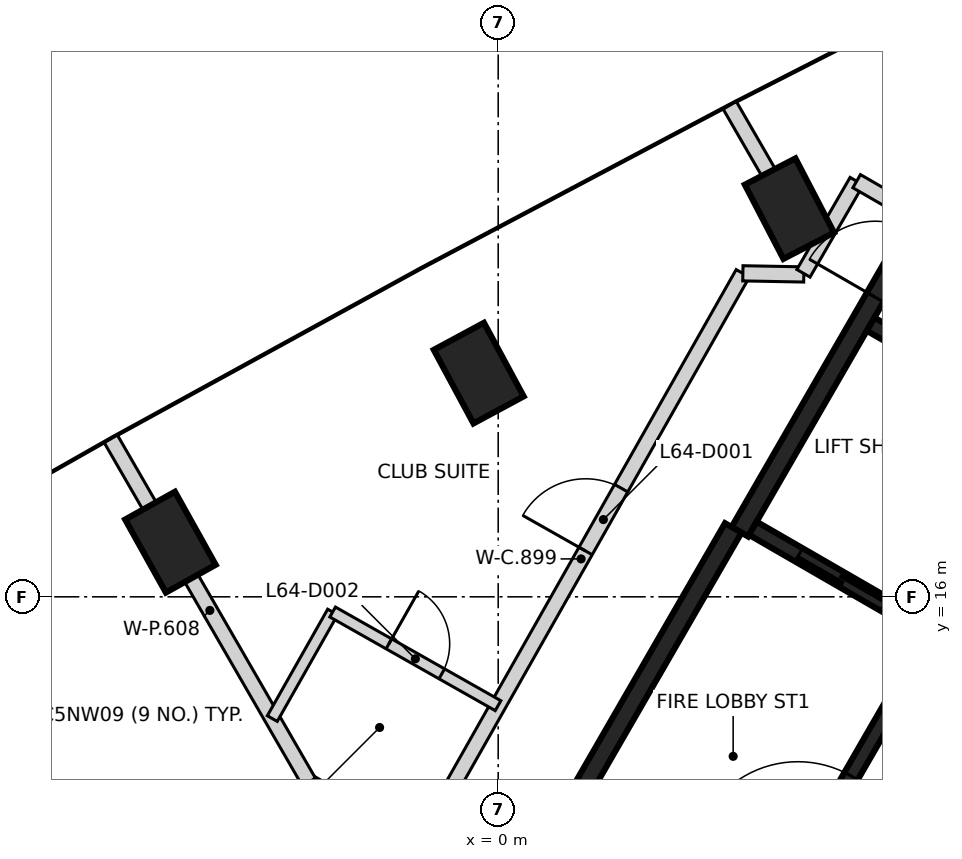
"""IFC4 building model, lengths in metres.
Left out: names, types, materials, properties, quantities, classifications, styles, units other than length and angle.
Written with IfcOpenShell. Run it as: python <this file> out.ifc"""

import sys

from ifc_helpers import new_model, si_unit, direction, frame, frame_2d, origin, origin_2d, place, context, subcontext, project, spatial, rectangle, extrude, element, fill, save


model = new_model("IFC4")
c1 = context("Model", 3, precision=1e-05, world=origin(), true_north=direction((0.0, 1.0)))
c2 = subcontext(c1, "Body", "Model", "MODEL_VIEW")
j1 = project(units=[si_unit("LENGTHUNIT", "METRE"), si_unit("PLANEANGLEUNIT", "RADIAN")], contexts=[c1])
p1 = place(None, origin())
s1 = spatial("IfcSite", under=j1, at=p1, CompositionType="ELEMENT")
p2 = place(p1, origin())
s2 = spatial("IfcBuilding", under=s1, at=p2, CompositionType="ELEMENT")
p3 = place(p2, frame((0.0, 0.0, 253.8)))
s3 = spatial("IfcBuildingStorey", under=s2, at=p3, CompositionType="ELEMENT", Elevation=253.8)
for number, where, z_axis, x_axis in (
    (1, (3.832, 21.107, -0.35), (0.0, 0.0, 1.0), (-0.461, 0.887, 0.0)),
    (2, (-0.256, 18.943, -0.35), (0.0, 0.0, 1.0), (-0.475, 0.88, 0.0)),
    (3, (-4.312, 16.719, -0.35), (0.0, 0.0, 1.0), (-0.487, 0.873, 0.0)),
):
    element("IfcColumn", number, at=place(p3, frame(where, z_axis=z_axis, x_axis=x_axis)), inside=s3, PredefinedType="COLUMN", context=c2, shape_type="SweptSolid", body=[
        extrude(rectangle(XDim=1.1, YDim=0.75, at=origin_2d()), origin(), (0.0, 0.0, 1.0), 2.64),
    ])
p4 = place(p3, frame((3.179, 16.856, 0.0), z_axis=(0.0, 0.0, 1.0), x_axis=(0.500001955336, 0.866024274868, 0.0)))
e4 = element("IfcWall", 4, at=p4, inside=s3, PredefinedType="SHEAR", context=c2, shape_type="SweptSolid", body=[
    extrude(rectangle(XDim=6.125, YDim=0.25, at=frame_2d((3.062, 0.0))), origin(), (0.0, 0.0, 1.0), 3.2),
])
p5 = place(p4, frame((3.563, 0.0, 0.0)))
e5 = element("IfcOpeningElement", 5, at=p5, cuts=e4, PredefinedType="OPENING", context=c2, shape_type="SweptSolid", body=[
    extrude(rectangle(XDim=1.0, YDim=2.1, at=frame_2d((0.5, 1.05))), frame((0.0, 0.135, 0.0), z_axis=(0.0, -1.0, 0.0), x_axis=(1.0, 0.0, 0.0)), (0.0, 0.0, 1.0), 0.27),
])
p6 = place(p3, frame((0.48, 12.381, 0.0), z_axis=(0.0, 0.0, 1.0), x_axis=(0.49999885962, 0.866026062182, 0.0)))
e6 = element("IfcWall", 6, at=p6, inside=s3, PredefinedType="SHEAR", context=c2, shape_type="SweptSolid", body=[
    extrude(rectangle(XDim=5.225, YDim=0.25, at=frame_2d((2.612, 0.0))), origin(), (0.0, 0.0, 1.0), 3.2),
])
p7 = place(p3, frame((3.057, 10.895, 0.0), z_axis=(0.0, 0.0, 1.0), x_axis=(0.500027839223, 0.866009330205, 0.0)))
e7 = element("IfcWall", 7, at=p7, inside=s3, PredefinedType="SHEAR", context=c2, shape_type="SweptSolid", body=[
    extrude(rectangle(XDim=5.098, YDim=0.2, at=frame_2d((2.549, 0.0))), origin(), (0.0, 0.0, 1.0), 3.2),
])
p8 = place(p7, frame((1.774, 0.0, 0.0)))
e8 = element("IfcOpeningElement", 8, at=p8, cuts=e7, PredefinedType="OPENING", context=c2, shape_type="SweptSolid", body=[
    extrude(rectangle(XDim=1.4, YDim=2.1, at=frame_2d((0.7, 1.05))), frame((0.0, 0.11, 0.0), z_axis=(0.0, -1.0, 0.0), x_axis=(1.0, 0.0, 0.0)), (0.0, 0.0, 1.0), 0.22),
])
p9 = place(p3, frame((5.646, 15.576, 0.0), z_axis=(0.0, 0.0, 1.0), x_axis=(-0.866018407898, 0.500012117035, 0.0)))
e9 = element("IfcWall", 9, at=p9, inside=s3, PredefinedType="SHEAR", context=c2, shape_type="SweptSolid", body=[
    extrude(rectangle(XDim=2.651, YDim=0.2, at=frame_2d((1.325, 0.0))), origin(), (0.0, 0.0, 1.0), 3.2),
])
p10 = place(p9, frame((0.652, 0.0, 0.0)))
e10 = element("IfcOpeningElement", 10, at=p10, cuts=e9, PredefinedType="OPENING", context=c2, shape_type="SweptSolid", body=[
    extrude(rectangle(XDim=1.3, YDim=2.1, at=frame_2d((0.65, 1.05))), frame((0.0, 0.11, 0.0), z_axis=(0.0, -1.0, 0.0), x_axis=(1.0, 0.0, 0.0)), (0.0, 0.0, 1.0), 0.22),
])
p11 = place(p3, frame((7.196, 18.26, 0.0), z_axis=(0.0, 0.0, 1.0), x_axis=(-0.866018407898, 0.500012117035, 0.0)))
e11 = element("IfcWall", 11, at=p11, inside=s3, PredefinedType="SHEAR", context=c2, shape_type="SweptSolid", body=[
    extrude(rectangle(XDim=2.651, YDim=0.2, at=frame_2d((1.325, 0.0))), origin(), (0.0, 0.0, 1.0), 3.2),
])
p12 = place(p3, frame((-2.483, 13.551, 0.0), z_axis=(0.0, 0.0, 1.0), x_axis=(0.499878046143, -0.866095802429, 0.0)))
e12 = element("IfcWall", 12, at=p12, inside=s3, PredefinedType="PARTITIONING", context=c2, shape_type="SweptSolid", body=[
    extrude(rectangle(XDim=5.977, YDim=0.2, at=frame_2d((2.988, 0.0))), origin(), (0.0, 0.0, 1.0), 3.2),
])
p13 = place(p12, frame((2.327, 0.0, 0.0)))
e13 = element("IfcOpeningElement", 13, at=p13, cuts=e12, PredefinedType="OPENING", context=c2, shape_type="SweptSolid", body=[
    extrude(rectangle(XDim=0.95, YDim=2.1, at=frame_2d((0.475, 1.05))), frame((0.0, 0.11, 0.0), z_axis=(0.0, -1.0, 0.0), x_axis=(1.0, 0.0, 0.0)), (0.0, 0.0, 1.0), 0.22),
])
p14 = place(p3, frame((-2.478, 13.556, 0.0), z_axis=(0.0, 0.0, 1.0), x_axis=(0.870609500021, -0.491974692919, 0.0)))
e14 = element("IfcWall", 14, at=p14, inside=s3, PredefinedType="PARTITIONING", context=c2, shape_type="SweptSolid", body=[
    extrude(rectangle(XDim=1.656, YDim=0.2, at=frame_2d((0.828, 0.0))), origin(), (0.0, 0.0, 1.0), 3.2),
])
p15 = place(p3, frame((-1.037, 12.741, 0.0), z_axis=(0.0, 0.0, 1.0), x_axis=(0.492679417867, 0.870210888929, 0.0)))
e15 = element("IfcWall", 15, at=p15, inside=s3, PredefinedType="PARTITIONING", context=c2, shape_type="SweptSolid", body=[
    extrude(rectangle(XDim=8.636, YDim=0.2, at=frame_2d((4.318, 0.0))), origin(), (0.0, 0.0, 1.0), 3.2),
])
p16 = place(p15, frame((4.438, 0.0, 0.0)))
e16 = element("IfcOpeningElement", 16, at=p16, cuts=e15, PredefinedType="OPENING", context=c2, shape_type="SweptSolid", body=[
    extrude(rectangle(XDim=0.95, YDim=2.1, at=frame_2d((0.475, 1.05))), frame((0.0, 0.11, 0.0), z_axis=(0.0, -1.0, 0.0), x_axis=(1.0, 0.0, 0.0)), (0.0, 0.0, 1.0), 0.22),
])
p17 = place(p3, frame((3.219, 20.256, 0.0), z_axis=(0.0, 0.0, 1.0), x_axis=(0.999821939894, -0.018870307541, 0.0)))
e17 = element("IfcWall", 17, at=p17, inside=s3, PredefinedType="PARTITIONING", context=c2, shape_type="SweptSolid", body=[
    extrude(rectangle(XDim=0.802, YDim=0.2, at=frame_2d((0.401, 0.0))), origin(), (0.0, 0.0, 1.0), 3.2),
])
p18 = place(p3, frame((4.016, 20.256, 0.0), z_axis=(0.0, 0.0, 1.0), x_axis=(0.500135180047, 0.865947343479, 0.0)))
e18 = element("IfcWall", 18, at=p18, inside=s3, PredefinedType="PARTITIONING", context=c2, shape_type="SweptSolid", body=[
    extrude(rectangle(XDim=1.399, YDim=0.2, at=frame_2d((0.7, 0.0))), origin(), (0.0, 0.0, 1.0), 3.2),
])
p19 = place(p3, frame((4.716, 21.468, 0.0), z_axis=(0.0, 0.0, 1.0), x_axis=(0.865912682783, -0.500195187698, 0.0)))
e19 = element("IfcWall", 19, at=p19, inside=s3, PredefinedType="PARTITIONING", context=c2, shape_type="SweptSolid", body=[
    extrude(rectangle(XDim=0.79, YDim=0.2, at=frame_2d((0.395, 0.0))), origin(), (0.0, 0.0, 1.0), 3.2),
])
p20 = place(p3, frame((-9.119, 15.795, 0.0), z_axis=(0.0, 0.0, 1.0), x_axis=(0.500015176972, -0.866016641178, 0.0)))
e20 = element("IfcWall", 20, at=p20, inside=s3, PredefinedType="PARTITIONING", context=c2, shape_type="SweptSolid", body=[
    extrude(rectangle(XDim=11.239, YDim=0.2, at=frame_2d((5.619, 0.0))), origin(), (0.0, 0.0, 1.0), 3.2),
])
p21 = place(p3, frame((-5.097, 18.078, 0.0), z_axis=(0.0, 0.0, 1.0), x_axis=(0.499977898262, -0.866038163853, 0.0)))
e21 = element("IfcWall", 21, at=p21, inside=s3, PredefinedType="PARTITIONING", context=c2, shape_type="SweptSolid", body=[
    extrude(rectangle(XDim=5.212, YDim=0.2, at=frame_2d((2.606, 0.0))), origin(), (0.0, 0.0, 1.0), 3.2),
])
p22 = place(p3, frame((3.046, 22.466, 0.0), z_axis=(0.0, 0.0, 1.0), x_axis=(0.500078449558, -0.865980106173, 0.0)))
e22 = element("IfcWall", 22, at=p22, inside=s3, PredefinedType="PARTITIONING", context=c2, shape_type="SweptSolid", body=[
    extrude(rectangle(XDim=1.9, YDim=0.2, at=frame_2d((0.95, 0.0))), origin(), (0.0, 0.0, 1.0), 3.2),
])
p23 = place(p3, frame((-2.972, 14.398, 0.0), z_axis=(0.0, 0.0, 1.0), x_axis=(0.492741112884, 0.870175956732, 0.0)))
e23 = element("IfcWall", 23, at=p23, inside=s3, PredefinedType="PARTITIONING", context=c2, shape_type="SweptSolid", body=[
    extrude(rectangle(XDim=1.611, YDim=0.15, at=frame_2d((0.806, 0.0))), origin(), (0.0, 0.0, 1.0), 3.2),
])
p24 = place(p3, frame((-2.178, 15.8, 0.0), z_axis=(0.0, 0.0, 1.0), x_axis=(0.870218946292, -0.492665186019, 0.0)))
e24 = element("IfcWall", 24, at=p24, inside=s3, PredefinedType="PARTITIONING", context=c2, shape_type="SweptSolid", body=[
    extrude(rectangle(XDim=2.5, YDim=0.15, at=frame_2d((1.25, 0.0))), origin(), (0.0, 0.0, 1.0), 3.2),
])
p25 = place(p24, frame((0.85, 0.0, 0.0)))
e25 = element("IfcOpeningElement", 25, at=p25, cuts=e24, PredefinedType="OPENING", context=c2, shape_type="SweptSolid", body=[
    extrude(rectangle(XDim=0.8, YDim=2.1, at=frame_2d((0.4, 1.05))), frame((0.0, 0.085, 0.0), z_axis=(0.0, -1.0, 0.0), x_axis=(1.0, 0.0, 0.0)), (0.0, 0.0, 1.0), 0.17),
])
p26 = place(p10, origin())
e26 = element("IfcDoor", 26, at=p26, inside=s3, OperationType="SLIDING_TO_LEFT", PredefinedType="DOOR", context=c2, shape_type="SweptSolid", body=[
    extrude(rectangle(XDim=1.3, YDim=2.1, at=frame_2d((0.65, 1.05))), frame((0.0, 0.025, 0.0), z_axis=(0.0, -1.0, 0.0), x_axis=(1.0, 0.0, 0.0)), (0.0, 0.0, 1.0), 0.05),
])
fill(e10, e26)
p27 = place(p5, origin())
e27 = element("IfcDoor", 27, at=p27, inside=s3, OperationType="SINGLE_SWING_LEFT", PredefinedType="DOOR", context=c2, shape_type="SweptSolid", body=[
    extrude(rectangle(XDim=1.0, YDim=2.1, at=frame_2d((0.5, 1.05))), frame((0.0, 0.025, 0.0), z_axis=(0.0, -1.0, 0.0), x_axis=(1.0, 0.0, 0.0)), (0.0, 0.0, 1.0), 0.05),
])
fill(e5, e27)
p28 = place(p8, origin())
e28 = element("IfcDoor", 28, at=p28, inside=s3, OperationType="SINGLE_SWING_LEFT", PredefinedType="DOOR", context=c2, shape_type="SweptSolid", body=[
    extrude(rectangle(XDim=1.4, YDim=2.1, at=frame_2d((0.7, 1.05))), frame((0.0, 0.025, 0.0), z_axis=(0.0, -1.0, 0.0), x_axis=(1.0, 0.0, 0.0)), (0.0, 0.0, 1.0), 0.05),
])
fill(e8, e28)
p29 = place(p16, origin())
e29 = element("IfcDoor", 29, at=p29, inside=s3, OperationType="SINGLE_SWING_LEFT", PredefinedType="DOOR", context=c2, shape_type="SweptSolid", body=[
    extrude(rectangle(XDim=0.95, YDim=2.1, at=frame_2d((0.475, 1.05))), frame((0.0, 0.025, 0.0), z_axis=(0.0, -1.0, 0.0), x_axis=(1.0, 0.0, 0.0)), (0.0, 0.0, 1.0), 0.05),
])
fill(e16, e29)
p30 = place(p25, origin())
e30 = element("IfcDoor", 30, at=p30, inside=s3, OperationType="SINGLE_SWING_LEFT", PredefinedType="DOOR", context=c2, shape_type="SweptSolid", body=[
    extrude(rectangle(XDim=0.8, YDim=2.1, at=frame_2d((0.4, 1.05))), frame((0.0, 0.025, 0.0), z_axis=(0.0, -1.0, 0.0), x_axis=(1.0, 0.0, 0.0)), (0.0, 0.0, 1.0), 0.05),
])
fill(e25, e30)
save(model, sys.argv[1])
